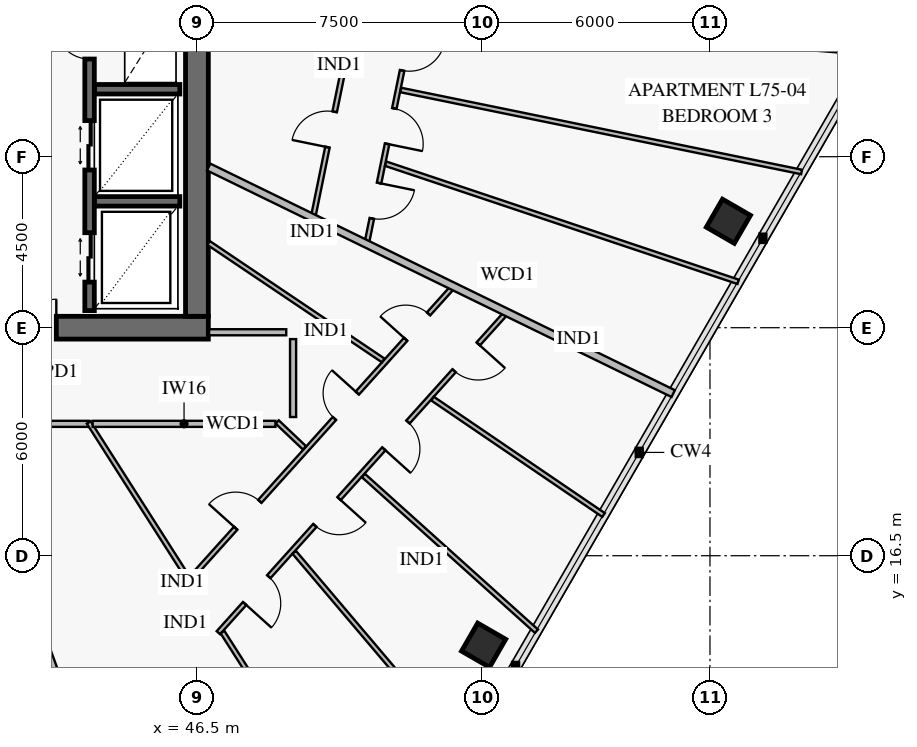
"""IFC4 building model, lengths in metres.
Left out: names, types, materials, properties, quantities, classifications, styles, units other than length and angle.
Written with IfcOpenShell. Run it as: python <this file> out.ifc"""

import sys

from ifc_helpers import new_model, si_unit, direction, frame, frame_2d, origin, origin_2d, place, context, subcontext, project, spatial, rectangle, extrude, element, fill, save


model = new_model("IFC4")
c1 = context("Model", 3, precision=1e-05, world=origin(), true_north=direction((0.0, 1.0)))
c2 = subcontext(c1, "Body", "Model", "MODEL_VIEW")
j1 = project(units=[si_unit("LENGTHUNIT", "METRE"), si_unit("PLANEANGLEUNIT", "RADIAN")], contexts=[c1])
p1 = place(None, origin())
s1 = spatial("IfcSite", under=j1, at=p1, CompositionType="ELEMENT")
p2 = place(p1, origin())
s2 = spatial("IfcBuilding", under=s1, at=p2, CompositionType="ELEMENT")
p3 = place(p2, frame((0.0, 0.0, 295.8)))
s3 = spatial("IfcBuildingStorey", under=s2, at=p3, CompositionType="ELEMENT", Elevation=295.8)
p4 = place(p3, frame((37.35, 22.5, 0.0), z_axis=(0.0, 0.0, 1.0), x_axis=(1.0, 0.0, 0.0)))
e1 = element("IfcWall", 1, at=p4, inside=s3, PredefinedType="SHEAR", context=c2, shape_type="SweptSolid", body=[
    extrude(rectangle(XDim=9.45, YDim=0.6, at=frame_2d((4.725, 0.0))), origin(), (0.0, 0.0, 1.0), 3.8),
])
p5 = place(p4, frame((3.95, 0.0, 0.0)))
e2 = element("IfcOpeningElement", 2, at=p5, cuts=e1, PredefinedType="OPENING", context=c2, shape_type="SweptSolid", body=[
    extrude(rectangle(XDim=1.5, YDim=2.15, at=frame_2d((0.75, 1.075))), frame((0.0, 0.312, 0.0), z_axis=(0.0, -1.0, 0.0), x_axis=(1.0, 0.0, 0.0)), (0.0, 0.0, 1.0), 0.624),
])
p6 = place(p3, frame((46.5, 22.8, 0.0), z_axis=(0.0, 0.0, 1.0), x_axis=(0.0, 1.0, 0.0)))
e3 = element("IfcWall", 3, at=p6, inside=s3, PredefinedType="SHEAR", context=c2, shape_type="SweptSolid", body=[
    extrude(rectangle(XDim=18.4, YDim=0.6, at=frame_2d((9.2, 0.0))), origin(), (0.0, 0.0, 1.0), 3.8),
])
p7 = place(p6, frame((8.95, 0.0, 0.0)))
e4 = element("IfcOpeningElement", 4, at=p7, cuts=e3, PredefinedType="OPENING", context=c2, shape_type="SweptSolid", body=[
    extrude(rectangle(XDim=1.1, YDim=2.15, at=frame_2d((0.55, 1.075))), frame((0.0, 0.312, 0.0), z_axis=(0.0, -1.0, 0.0), x_axis=(1.0, 0.0, 0.0)), (0.0, 0.0, 1.0), 0.624),
])
for number, where, z_axis, x_axis in (
    (5, (54.044, 14.145, 0.0), (0.0, 0.0, 1.0), (0.5, 0.866, 0.0)),
    (6, (60.485, 25.301, 0.0), (0.0, 0.0, 1.0), (0.5, 0.866, 0.0)),
):
    element("IfcColumn", number, at=place(p3, frame(where, z_axis=z_axis, x_axis=x_axis)), inside=s3, PredefinedType="COLUMN", context=c2, shape_type="SweptSolid", body=[
        extrude(rectangle(XDim=0.85, YDim=0.85, at=origin_2d()), origin(), (0.0, 0.0, 1.0), 3.55),
    ])
for number, where, z_axis, x_axis in (
    (7, (43.8, 25.825, 0.0), (0.0, 0.0, 1.0), (1.0, 0.0, 0.0)),
    (8, (43.8, 28.775, 0.0), (0.0, 0.0, 1.0), (1.0, 0.0, 0.0)),
):
    element("IfcWall", number, at=place(p3, frame(where, z_axis=z_axis, x_axis=x_axis)), inside=s3, PredefinedType="SOLIDWALL", context=c2, shape_type="SweptSolid", body=[
        extrude(rectangle(XDim=2.25, YDim=0.25, at=frame_2d((1.125, 0.0))), origin(), (0.0, 0.0, 1.0), 3.8),
    ])
p8 = place(p3, frame((43.675, 22.95, 0.0), z_axis=(0.0, 0.0, 1.0), x_axis=(0.0, 1.0, 0.0)))
e9 = element("IfcWall", 9, at=p8, inside=s3, PredefinedType="SOLIDWALL", context=c2, shape_type="SweptSolid", body=[
    extrude(rectangle(XDim=8.2, YDim=0.25, at=frame_2d((4.1, 0.0))), origin(), (0.0, 0.0, 1.0), 3.8),
])
p9 = place(p8, frame((0.75, 0.0, 0.0)))
e10 = element("IfcOpeningElement", 10, at=p9, cuts=e9, PredefinedType="OPENING", context=c2, shape_type="SweptSolid", body=[
    extrude(rectangle(XDim=1.3, YDim=2.3, at=frame_2d((0.65, 1.15))), frame((0.0, 0.137, 0.0), z_axis=(0.0, -1.0, 0.0), x_axis=(1.0, 0.0, 0.0)), (0.0, 0.0, 1.0), 0.274),
])
p10 = place(p8, frame((3.7, 0.0, 0.0)))
e11 = element("IfcOpeningElement", 11, at=p10, cuts=e9, PredefinedType="OPENING", context=c2, shape_type="SweptSolid", body=[
    extrude(rectangle(XDim=1.3, YDim=2.3, at=frame_2d((0.65, 1.15))), frame((0.0, 0.137, 0.0), z_axis=(0.0, -1.0, 0.0), x_axis=(1.0, 0.0, 0.0)), (0.0, 0.0, 1.0), 0.274),
])
p11 = place(p8, frame((6.62, 0.0, 0.0)))
e12 = element("IfcOpeningElement", 12, at=p11, cuts=e9, PredefinedType="OPENING", context=c2, shape_type="SweptSolid", body=[
    extrude(rectangle(XDim=0.9, YDim=2.1, at=frame_2d((0.45, 1.05))), frame((0.0, 0.137, 0.0), z_axis=(0.0, -1.0, 0.0), x_axis=(1.0, 0.0, 0.0)), (0.0, 0.0, 1.0), 0.274),
])
p12 = place(p3, frame((46.227, 15.786, 0.0), z_axis=(0.0, 0.0, 1.0), x_axis=(0.668867693005, 0.743381469539, 0.0)))
e13 = element("IfcWall", 13, at=p12, inside=s3, PredefinedType="PARTITIONING", context=c2, shape_type="SweptSolid", body=[
    extrude(rectangle(XDim=10.426, YDim=0.12, at=frame_2d((5.213, 0.0))), origin(), (0.0, 0.0, 1.0), 2.95),
])
p13 = place(p12, frame((1.934, 0.0, 0.0)))
e14 = element("IfcOpeningElement", 14, at=p13, cuts=e13, PredefinedType="OPENING", context=c2, shape_type="SweptSolid", body=[
    extrude(rectangle(XDim=0.95, YDim=2.1, at=frame_2d((0.475, 1.05))), frame((0.0, 0.072, 0.0), z_axis=(0.0, -1.0, 0.0), x_axis=(1.0, 0.0, 0.0)), (0.0, 0.0, 1.0), 0.144),
])
p14 = place(p12, frame((5.818, 0.0, 0.0)))
e15 = element("IfcOpeningElement", 15, at=p14, cuts=e13, PredefinedType="OPENING", context=c2, shape_type="SweptSolid", body=[
    extrude(rectangle(XDim=0.9, YDim=2.1, at=frame_2d((0.45, 1.05))), frame((0.0, 0.072, 0.0), z_axis=(0.0, -1.0, 0.0), x_axis=(1.0, 0.0, 0.0)), (0.0, 0.0, 1.0), 0.144),
])
p15 = place(p12, frame((8.621, 0.0, 0.0)))
e16 = element("IfcOpeningElement", 16, at=p15, cuts=e13, PredefinedType="OPENING", context=c2, shape_type="SweptSolid", body=[
    extrude(rectangle(XDim=0.9, YDim=2.1, at=frame_2d((0.45, 1.05))), frame((0.0, 0.072, 0.0), z_axis=(0.0, -1.0, 0.0), x_axis=(1.0, 0.0, 0.0)), (0.0, 0.0, 1.0), 0.144),
])
p16 = place(p3, frame((47.064, 14.474, 0.0), z_axis=(0.0, 0.0, 1.0), x_axis=(0.66887365587, 0.743376104326, 0.0)))
e17 = element("IfcWall", 17, at=p16, inside=s3, PredefinedType="PARTITIONING", context=c2, shape_type="SweptSolid", body=[
    extrude(rectangle(XDim=11.256, YDim=0.12, at=frame_2d((5.628, 0.0))), origin(), (0.0, 0.0, 1.0), 2.95),
])
p17 = place(p16, frame((1.033, 0.0, 0.0)))
e18 = element("IfcOpeningElement", 18, at=p17, cuts=e17, PredefinedType="OPENING", context=c2, shape_type="SweptSolid", body=[
    extrude(rectangle(XDim=0.95, YDim=2.1, at=frame_2d((0.475, 1.05))), frame((0.0, 0.072, 0.0), z_axis=(0.0, -1.0, 0.0), x_axis=(1.0, 0.0, 0.0)), (0.0, 0.0, 1.0), 0.144),
])
p18 = place(p16, frame((3.797, 0.0, 0.0)))
e19 = element("IfcOpeningElement", 19, at=p18, cuts=e17, PredefinedType="OPENING", context=c2, shape_type="SweptSolid", body=[
    extrude(rectangle(XDim=0.95, YDim=2.1, at=frame_2d((0.475, 1.05))), frame((0.0, 0.072, 0.0), z_axis=(0.0, -1.0, 0.0), x_axis=(1.0, 0.0, 0.0)), (0.0, 0.0, 1.0), 0.144),
])
p19 = place(p16, frame((6.509, 0.0, 0.0)))
e20 = element("IfcOpeningElement", 20, at=p19, cuts=e17, PredefinedType="OPENING", context=c2, shape_type="SweptSolid", body=[
    extrude(rectangle(XDim=0.95, YDim=2.1, at=frame_2d((0.475, 1.05))), frame((0.0, 0.072, 0.0), z_axis=(0.0, -1.0, 0.0), x_axis=(1.0, 0.0, 0.0)), (0.0, 0.0, 1.0), 0.144),
])
p20 = place(p16, frame((9.273, 0.0, 0.0)))
e21 = element("IfcOpeningElement", 21, at=p20, cuts=e17, PredefinedType="OPENING", context=c2, shape_type="SweptSolid", body=[
    extrude(rectangle(XDim=0.95, YDim=2.1, at=frame_2d((0.475, 1.05))), frame((0.0, 0.072, 0.0), z_axis=(0.0, -1.0, 0.0), x_axis=(1.0, 0.0, 0.0)), (0.0, 0.0, 1.0), 0.144),
])
p21 = place(p3, frame((40.519, 19.97, 0.0), z_axis=(0.0, 0.0, 1.0), x_axis=(1.0, 0.0, 0.0)))
e22 = element("IfcWall", 22, at=p21, inside=s3, PredefinedType="PARTITIONING", context=c2, shape_type="SweptSolid", body=[
    extrude(rectangle(XDim=3.133, YDim=0.16, at=frame_2d((1.566, 0.0))), origin(), (0.0, 0.0, 1.0), 3.55),
])
p22 = place(p21, frame((1.042, 0.0, 0.0)))
e23 = element("IfcOpeningElement", 23, at=p22, cuts=e22, PredefinedType="OPENING", context=c2, shape_type="SweptSolid", body=[
    extrude(rectangle(XDim=1.05, YDim=2.15, at=frame_2d((0.525, 1.075))), frame((0.0, 0.092, 0.0), z_axis=(0.0, -1.0, 0.0), x_axis=(1.0, 0.0, 0.0)), (0.0, 0.0, 1.0), 0.184),
])
p23 = place(p3, frame((49.56, 25.421, 0.0), z_axis=(0.0, 0.0, 1.0), x_axis=(0.200371234372, 0.97972004595, 0.0)))
e24 = element("IfcWall", 24, at=p23, inside=s3, PredefinedType="PARTITIONING", context=c2, shape_type="SweptSolid", body=[
    extrude(rectangle(XDim=7.456, YDim=0.12, at=frame_2d((3.728, 0.0))), origin(), (0.0, 0.0, 1.0), 2.95),
])
p24 = place(p23, frame((1.867, 0.0, 0.0)))
e25 = element("IfcOpeningElement", 25, at=p24, cuts=e24, PredefinedType="OPENING", context=c2, shape_type="SweptSolid", body=[
    extrude(rectangle(XDim=0.95, YDim=2.1, at=frame_2d((0.475, 1.05))), frame((0.0, 0.072, 0.0), z_axis=(0.0, -1.0, 0.0), x_axis=(1.0, 0.0, 0.0)), (0.0, 0.0, 1.0), 0.144),
])
p25 = place(p23, frame((5.517, 0.0, 0.0)))
e26 = element("IfcOpeningElement", 26, at=p25, cuts=e24, PredefinedType="OPENING", context=c2, shape_type="SweptSolid", body=[
    extrude(rectangle(XDim=0.9, YDim=2.1, at=frame_2d((0.45, 1.05))), frame((0.0, 0.072, 0.0), z_axis=(0.0, -1.0, 0.0), x_axis=(1.0, 0.0, 0.0)), (0.0, 0.0, 1.0), 0.144),
])
p26 = place(p3, frame((50.974, 24.747, 0.0), z_axis=(0.0, 0.0, 1.0), x_axis=(0.200363153117, 0.979721698684, 0.0)))
e27 = element("IfcWall", 27, at=p26, inside=s3, PredefinedType="PARTITIONING", context=c2, shape_type="SweptSolid", body=[
    extrude(rectangle(XDim=8.21, YDim=0.12, at=frame_2d((4.105, 0.0))), origin(), (0.0, 0.0, 1.0), 2.95),
])
p27 = place(p26, frame((0.642, 0.0, 0.0)))
e28 = element("IfcOpeningElement", 28, at=p27, cuts=e27, PredefinedType="OPENING", context=c2, shape_type="SweptSolid", body=[
    extrude(rectangle(XDim=0.95, YDim=2.1, at=frame_2d((0.475, 1.05))), frame((0.0, 0.072, 0.0), z_axis=(0.0, -1.0, 0.0), x_axis=(1.0, 0.0, 0.0)), (0.0, 0.0, 1.0), 0.144),
])
p28 = place(p26, frame((2.644, 0.0, 0.0)))
e29 = element("IfcOpeningElement", 29, at=p28, cuts=e27, PredefinedType="OPENING", context=c2, shape_type="SweptSolid", body=[
    extrude(rectangle(XDim=0.95, YDim=2.1, at=frame_2d((0.475, 1.05))), frame((0.0, 0.072, 0.0), z_axis=(0.0, -1.0, 0.0), x_axis=(1.0, 0.0, 0.0)), (0.0, 0.0, 1.0), 0.144),
])
p29 = place(p26, frame((4.616, 0.0, 0.0)))
e30 = element("IfcOpeningElement", 30, at=p29, cuts=e27, PredefinedType="OPENING", context=c2, shape_type="SweptSolid", body=[
    extrude(rectangle(XDim=0.95, YDim=2.1, at=frame_2d((0.475, 1.05))), frame((0.0, 0.072, 0.0), z_axis=(0.0, -1.0, 0.0), x_axis=(1.0, 0.0, 0.0)), (0.0, 0.0, 1.0), 0.144),
])
p30 = place(p26, frame((6.618, 0.0, 0.0)))
e31 = element("IfcOpeningElement", 31, at=p30, cuts=e27, PredefinedType="OPENING", context=c2, shape_type="SweptSolid", body=[
    extrude(rectangle(XDim=0.95, YDim=2.1, at=frame_2d((0.475, 1.05))), frame((0.0, 0.072, 0.0), z_axis=(0.0, -1.0, 0.0), x_axis=(1.0, 0.0, 0.0)), (0.0, 0.0, 1.0), 0.144),
])
p31 = place(p3, frame((40.364, 20.01, 0.0), z_axis=(0.0, 0.0, 1.0), x_axis=(0.342019888345, -0.939692713591, 0.0)))
e32 = element("IfcWall", 32, at=p31, inside=s3, PredefinedType="PARTITIONING", context=c2, shape_type="SweptSolid", body=[
    extrude(rectangle(XDim=14.445, YDim=0.2, at=frame_2d((7.222, 0.0))), origin(), (0.0, 0.0, 1.0), 2.93),
])
p32 = place(p3, frame((48.612, 20.02, 0.0), z_axis=(0.0, 0.0, 1.0), x_axis=(0.725214586294, -0.688522914525, 0.0)))
e33 = element("IfcWall", 33, at=p32, inside=s3, PredefinedType="PARTITIONING", context=c2, shape_type="SweptSolid", body=[
    extrude(rectangle(XDim=0.991, YDim=0.12, at=frame_2d((0.496, 0.0))), origin(), (0.0, 0.0, 1.0), 3.55),
])
p33 = place(p3, frame((46.808, 24.729, 0.0), z_axis=(0.0, 0.0, 1.0), x_axis=(0.829729536965, -0.558165652372, 0.0)))
e34 = element("IfcWall", 34, at=p33, inside=s3, PredefinedType="PARTITIONING", context=c2, shape_type="SweptSolid", body=[
    extrude(rectangle(XDim=5.536, YDim=0.12, at=frame_2d((2.768, 0.0))), origin(), (0.0, 0.0, 1.0), 3.55),
])
p34 = place(p3, frame((49.06, 16.59, 0.0), z_axis=(0.0, 0.0, 1.0), x_axis=(0.646504412068, -0.76291024713, 0.0)))
e35 = element("IfcWall", 35, at=p34, inside=s3, PredefinedType="PARTITIONING", context=c2, shape_type="SweptSolid", body=[
    extrude(rectangle(XDim=6.967, YDim=0.12, at=frame_2d((3.484, 0.0))), origin(), (0.0, 0.0, 1.0), 2.93),
])
p35 = place(p3, frame((50.879, 18.612, 0.0), z_axis=(0.0, 0.0, 1.0), x_axis=(0.7433595212, -0.668892085647, 0.0)))
e36 = element("IfcWall", 36, at=p35, inside=s3, PredefinedType="PARTITIONING", context=c2, shape_type="SweptSolid", body=[
    extrude(rectangle(XDim=6.127, YDim=0.12, at=frame_2d((3.064, 0.0))), origin(), (0.0, 0.0, 1.0), 2.93),
])
p36 = place(p3, frame((52.699, 20.635, 0.0), z_axis=(0.0, 0.0, 1.0), x_axis=(0.826692890459, -0.562653414515, 0.0)))
e37 = element("IfcWall", 37, at=p36, inside=s3, PredefinedType="PARTITIONING", context=c2, shape_type="SweptSolid", body=[
    extrude(rectangle(XDim=5.444, YDim=0.12, at=frame_2d((2.722, 0.0))), origin(), (0.0, 0.0, 1.0), 2.93),
])
p37 = place(p3, frame((43.652, 20.007, 0.0), z_axis=(0.0, 0.0, 1.0), x_axis=(0.537879291551, -0.843021866692, 0.0)))
e38 = element("IfcWall", 38, at=p37, inside=s3, PredefinedType="PARTITIONING", context=c2, shape_type="SweptSolid", body=[
    extrude(rectangle(XDim=4.845, YDim=0.12, at=frame_2d((2.423, 0.0))), origin(), (0.0, 0.0, 1.0), 3.55),
])
p38 = place(p3, frame((47.171, 14.491, 0.0), z_axis=(0.0, 0.0, 1.0), x_axis=(0.537861418624, -0.843033270017, 0.0)))
e39 = element("IfcWall", 39, at=p38, inside=s3, PredefinedType="PARTITIONING", context=c2, shape_type="SweptSolid", body=[
    extrude(rectangle(XDim=3.075, YDim=0.12, at=frame_2d((1.538, 0.0))), origin(), (0.0, 0.0, 1.0), 3.55),
])
p39 = place(p3, frame((46.808, 26.729, 0.0), z_axis=(0.0, 0.0, 1.0), x_axis=(0.89879587414, -0.438367399141, 0.0)))
e40 = element("IfcWall", 40, at=p39, inside=s3, PredefinedType="PARTITIONING", context=c2, shape_type="SweptSolid", body=[
    extrude(rectangle(XDim=13.601, YDim=0.2, at=frame_2d((6.8, 0.0))), origin(), (0.0, 0.0, 1.0), 2.93),
])
p40 = place(p3, frame((51.466, 26.816, 0.0), z_axis=(0.0, 0.0, 1.0), x_axis=(0.948160423288, -0.31779208881, 0.0)))
e41 = element("IfcWall", 41, at=p40, inside=s3, PredefinedType="PARTITIONING", context=c2, shape_type="SweptSolid", body=[
    extrude(rectangle(XDim=9.783, YDim=0.12, at=frame_2d((4.891, 0.0))), origin(), (0.0, 0.0, 1.0), 2.93),
])
p41 = place(p3, frame((51.863, 28.755, 0.0), z_axis=(0.0, 0.0, 1.0), x_axis=(0.979715741748, -0.20039227872, 0.0)))
e42 = element("IfcWall", 42, at=p41, inside=s3, PredefinedType="PARTITIONING", context=c2, shape_type="SweptSolid", body=[
    extrude(rectangle(XDim=10.766, YDim=0.12, at=frame_2d((5.383, 0.0))), origin(), (0.0, 0.0, 1.0), 2.93),
])
p42 = place(p3, frame((52.26, 30.695, 0.0), z_axis=(0.0, 0.0, 1.0), x_axis=(0.996793701051, -0.08001448335, 0.0)))
e43 = element("IfcWall", 43, at=p42, inside=s3, PredefinedType="PARTITIONING", context=c2, shape_type="SweptSolid", body=[
    extrude(rectangle(XDim=12.0, YDim=0.12, at=frame_2d((6.0, 0.0))), origin(), (0.0, 0.0, 1.0), 2.93),
])
p43 = place(p3, frame((43.757, 19.97, 0.0), z_axis=(0.0, 0.0, 1.0), x_axis=(1.0, 0.0, 0.0)))
e44 = element("IfcWall", 44, at=p43, inside=s3, PredefinedType="PARTITIONING", context=c2, shape_type="SweptSolid", body=[
    extrude(rectangle(XDim=4.809, YDim=0.16, at=frame_2d((2.405, 0.0))), origin(), (0.0, 0.0, 1.0), 2.95),
])
p44 = place(p3, frame((49.03, 20.15, 0.0), z_axis=(0.0, 0.0, 1.0), x_axis=(0.0, 1.0, 0.0)))
e45 = element("IfcWall", 45, at=p44, inside=s3, PredefinedType="PARTITIONING", context=c2, shape_type="SweptSolid", body=[
    extrude(rectangle(XDim=2.05, YDim=0.16, at=frame_2d((1.025, 0.0))), origin(), (0.0, 0.0, 1.0), 3.55),
])
p45 = place(p3, frame((48.85, 22.38, 0.0), z_axis=(0.0, 0.0, 1.0), x_axis=(-1.0, 0.0, 0.0)))
e46 = element("IfcWall", 46, at=p45, inside=s3, PredefinedType="PARTITIONING", context=c2, shape_type="SweptSolid", body=[
    extrude(rectangle(XDim=2.03, YDim=0.16, at=frame_2d((1.015, 0.0))), origin(), (0.0, 0.0, 1.0), 3.55),
])
p46 = place(p5, origin())
e47 = element("IfcDoor", 47, at=p46, inside=s3, OperationType="DOUBLE_DOOR_SINGLE_SWING", PredefinedType="DOOR", context=c2, shape_type="SweptSolid", body=[
    extrude(rectangle(XDim=1.5, YDim=2.15, at=frame_2d((0.75, 1.075))), frame((0.0, 0.025, 0.0), z_axis=(0.0, -1.0, 0.0), x_axis=(1.0, 0.0, 0.0)), (0.0, 0.0, 1.0), 0.05),
])
fill(e2, e47)
p47 = place(p9, origin())
e48 = element("IfcDoor", 48, at=p47, inside=s3, OperationType="DOUBLE_DOOR_SLIDING", PredefinedType="DOOR", context=c2, shape_type="SweptSolid", body=[
    extrude(rectangle(XDim=1.3, YDim=2.3, at=frame_2d((0.65, 1.15))), frame((0.0, 0.025, 0.0), z_axis=(0.0, -1.0, 0.0), x_axis=(1.0, 0.0, 0.0)), (0.0, 0.0, 1.0), 0.05),
])
fill(e10, e48)
p48 = place(p10, origin())
e49 = element("IfcDoor", 49, at=p48, inside=s3, OperationType="DOUBLE_DOOR_SLIDING", PredefinedType="DOOR", context=c2, shape_type="SweptSolid", body=[
    extrude(rectangle(XDim=1.3, YDim=2.3, at=frame_2d((0.65, 1.15))), frame((0.0, 0.025, 0.0), z_axis=(0.0, -1.0, 0.0), x_axis=(1.0, 0.0, 0.0)), (0.0, 0.0, 1.0), 0.05),
])
fill(e11, e49)
p49 = place(p11, origin())
e50 = element("IfcDoor", 50, at=p49, inside=s3, OperationType="SINGLE_SWING_RIGHT", PredefinedType="DOOR", context=c2, shape_type="SweptSolid", body=[
    extrude(rectangle(XDim=0.9, YDim=2.1, at=frame_2d((0.45, 1.05))), frame((0.0, 0.025, 0.0), z_axis=(0.0, -1.0, 0.0), x_axis=(1.0, 0.0, 0.0)), (0.0, 0.0, 1.0), 0.05),
])
fill(e12, e50)
p50 = place(p13, origin())
e51 = element("IfcDoor", 51, at=p50, inside=s3, OperationType="SINGLE_SWING_LEFT", PredefinedType="DOOR", context=c2, shape_type="SweptSolid", body=[
    extrude(rectangle(XDim=0.95, YDim=2.1, at=frame_2d((0.475, 1.05))), frame((0.0, 0.025, 0.0), z_axis=(0.0, -1.0, 0.0), x_axis=(1.0, 0.0, 0.0)), (0.0, 0.0, 1.0), 0.05),
])
fill(e14, e51)
p51 = place(p14, origin())
e52 = element("IfcDoor", 52, at=p51, inside=s3, OperationType="SINGLE_SWING_RIGHT", PredefinedType="DOOR", context=c2, shape_type="SweptSolid", body=[
    extrude(rectangle(XDim=0.9, YDim=2.1, at=frame_2d((0.45, 1.05))), frame((0.0, 0.025, 0.0), z_axis=(0.0, -1.0, 0.0), x_axis=(1.0, 0.0, 0.0)), (0.0, 0.0, 1.0), 0.05),
])
fill(e15, e52)
p52 = place(p15, origin())
e53 = element("IfcDoor", 53, at=p52, inside=s3, OperationType="SINGLE_SWING_LEFT", PredefinedType="DOOR", context=c2, shape_type="SweptSolid", body=[
    extrude(rectangle(XDim=0.9, YDim=2.1, at=frame_2d((0.45, 1.05))), frame((0.0, 0.025, 0.0), z_axis=(0.0, -1.0, 0.0), x_axis=(1.0, 0.0, 0.0)), (0.0, 0.0, 1.0), 0.05),
])
fill(e16, e53)
p53 = place(p17, frame((0.95, 0.0, 0.0), z_axis=(0.0, 0.0, 1.0), x_axis=(-1.0, 0.0, 0.0)))
e54 = element("IfcDoor", 54, at=p53, inside=s3, OperationType="SINGLE_SWING_RIGHT", PredefinedType="DOOR", context=c2, shape_type="SweptSolid", body=[
    extrude(rectangle(XDim=0.95, YDim=2.1, at=frame_2d((0.475, 1.05))), frame((0.0, 0.025, 0.0), z_axis=(0.0, -1.0, 0.0), x_axis=(1.0, 0.0, 0.0)), (0.0, 0.0, 1.0), 0.05),
])
fill(e18, e54)
p54 = place(p18, frame((0.95, 0.0, 0.0), z_axis=(0.0, 0.0, 1.0), x_axis=(-1.0, 0.0, 0.0)))
e55 = element("IfcDoor", 55, at=p54, inside=s3, OperationType="SINGLE_SWING_LEFT", PredefinedType="DOOR", context=c2, shape_type="SweptSolid", body=[
    extrude(rectangle(XDim=0.95, YDim=2.1, at=frame_2d((0.475, 1.05))), frame((0.0, 0.025, 0.0), z_axis=(0.0, -1.0, 0.0), x_axis=(1.0, 0.0, 0.0)), (0.0, 0.0, 1.0), 0.05),
])
fill(e19, e55)
p55 = place(p19, frame((0.95, 0.0, 0.0), z_axis=(0.0, 0.0, 1.0), x_axis=(-1.0, 0.0, 0.0)))
e56 = element("IfcDoor", 56, at=p55, inside=s3, OperationType="SINGLE_SWING_RIGHT", PredefinedType="DOOR", context=c2, shape_type="SweptSolid", body=[
    extrude(rectangle(XDim=0.95, YDim=2.1, at=frame_2d((0.475, 1.05))), frame((0.0, 0.025, 0.0), z_axis=(0.0, -1.0, 0.0), x_axis=(1.0, 0.0, 0.0)), (0.0, 0.0, 1.0), 0.05),
])
fill(e20, e56)
p56 = place(p20, frame((0.95, 0.0, 0.0), z_axis=(0.0, 0.0, 1.0), x_axis=(-1.0, 0.0, 0.0)))
e57 = element("IfcDoor", 57, at=p56, inside=s3, OperationType="SINGLE_SWING_LEFT", PredefinedType="DOOR", context=c2, shape_type="SweptSolid", body=[
    extrude(rectangle(XDim=0.95, YDim=2.1, at=frame_2d((0.475, 1.05))), frame((0.0, 0.025, 0.0), z_axis=(0.0, -1.0, 0.0), x_axis=(1.0, 0.0, 0.0)), (0.0, 0.0, 1.0), 0.05),
])
fill(e21, e57)
p57 = place(p24, origin())
e58 = element("IfcDoor", 58, at=p57, inside=s3, OperationType="SINGLE_SWING_LEFT", PredefinedType="DOOR", context=c2, shape_type="SweptSolid", body=[
    extrude(rectangle(XDim=0.95, YDim=2.1, at=frame_2d((0.475, 1.05))), frame((0.0, 0.025, 0.0), z_axis=(0.0, -1.0, 0.0), x_axis=(1.0, 0.0, 0.0)), (0.0, 0.0, 1.0), 0.05),
])
fill(e25, e58)
p58 = place(p27, frame((0.95, 0.0, 0.0), z_axis=(0.0, 0.0, 1.0), x_axis=(-1.0, 0.0, 0.0)))
e59 = element("IfcDoor", 59, at=p58, inside=s3, OperationType="SINGLE_SWING_LEFT", PredefinedType="DOOR", context=c2, shape_type="SweptSolid", body=[
    extrude(rectangle(XDim=0.95, YDim=2.1, at=frame_2d((0.475, 1.05))), frame((0.0, 0.025, 0.0), z_axis=(0.0, -1.0, 0.0), x_axis=(1.0, 0.0, 0.0)), (0.0, 0.0, 1.0), 0.05),
])
fill(e28, e59)
p59 = place(p28, frame((0.95, 0.0, 0.0), z_axis=(0.0, 0.0, 1.0), x_axis=(-1.0, 0.0, 0.0)))
e60 = element("IfcDoor", 60, at=p59, inside=s3, OperationType="SINGLE_SWING_RIGHT", PredefinedType="DOOR", context=c2, shape_type="SweptSolid", body=[
    extrude(rectangle(XDim=0.95, YDim=2.1, at=frame_2d((0.475, 1.05))), frame((0.0, 0.025, 0.0), z_axis=(0.0, -1.0, 0.0), x_axis=(1.0, 0.0, 0.0)), (0.0, 0.0, 1.0), 0.05),
])
fill(e29, e60)
p60 = place(p29, frame((0.95, 0.0, 0.0), z_axis=(0.0, 0.0, 1.0), x_axis=(-1.0, 0.0, 0.0)))
e61 = element("IfcDoor", 61, at=p60, inside=s3, OperationType="SINGLE_SWING_LEFT", PredefinedType="DOOR", context=c2, shape_type="SweptSolid", body=[
    extrude(rectangle(XDim=0.95, YDim=2.1, at=frame_2d((0.475, 1.05))), frame((0.0, 0.025, 0.0), z_axis=(0.0, -1.0, 0.0), x_axis=(1.0, 0.0, 0.0)), (0.0, 0.0, 1.0), 0.05),
])
fill(e30, e61)
save(model, sys.argv[1])
